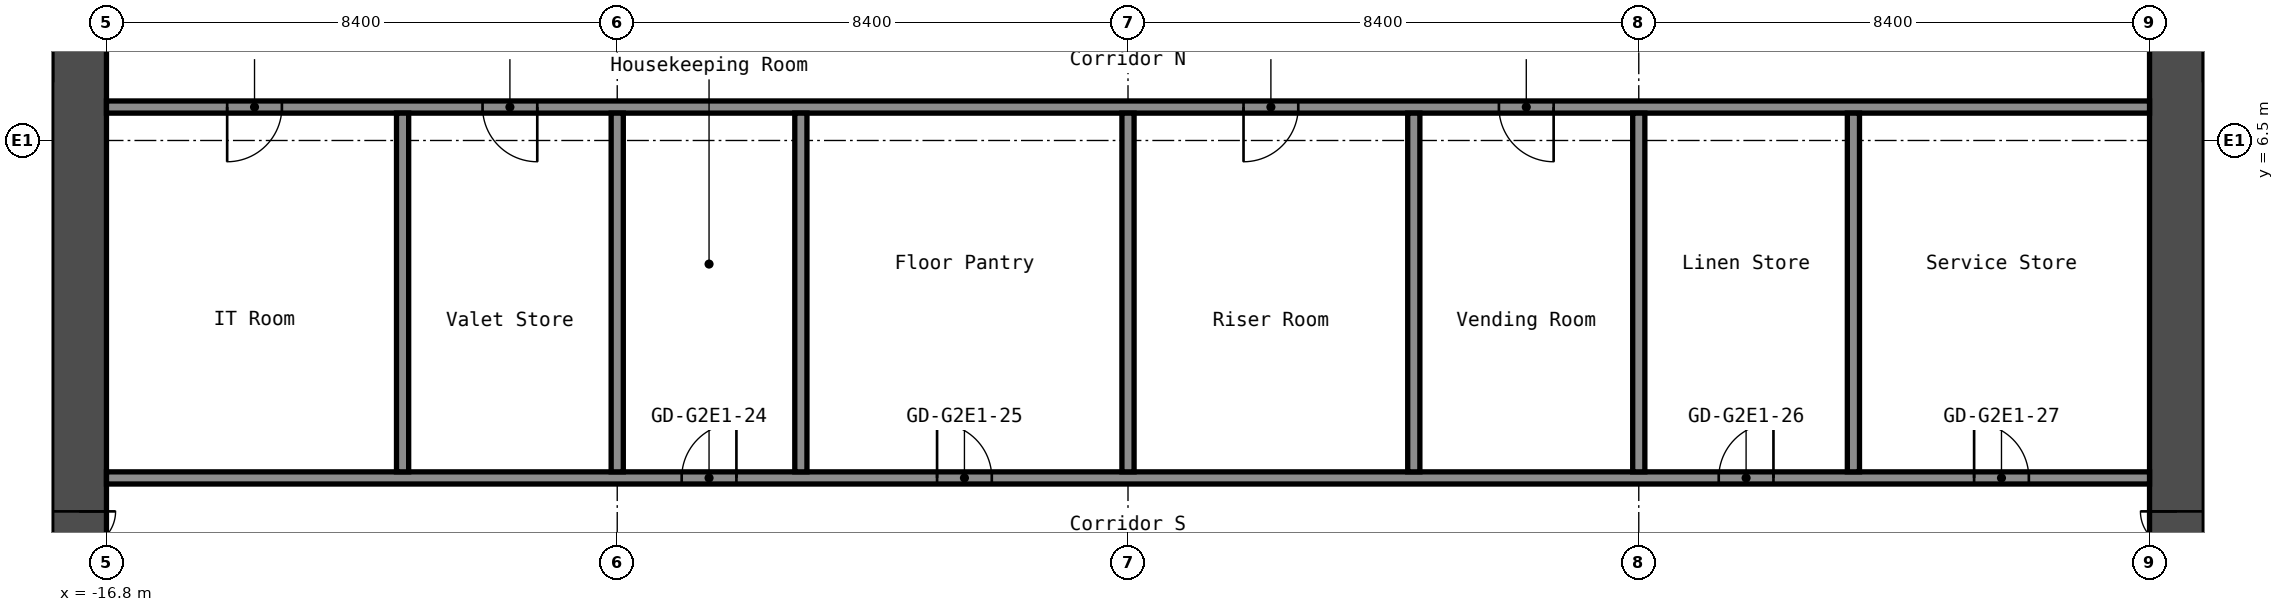
"""IFC4 building model, lengths in metres.
Left out: names, types, materials, properties, quantities, classifications, styles, units other than length and angle.
Written with IfcOpenShell. Run it as: python <this file> out.ifc"""

import sys

from ifc_helpers import new_model, si_unit, direction, frame, frame_2d, origin, place, context, subcontext, project, spatial, rectangle, extrude, element, fill, save


model = new_model("IFC4")
c1 = context("Model", 3, precision=1e-05, world=origin(), true_north=direction((0.0, 1.0)))
c2 = subcontext(c1, "Body", "Model", "MODEL_VIEW")
j1 = project(units=[si_unit("LENGTHUNIT", "METRE"), si_unit("PLANEANGLEUNIT", "RADIAN")], contexts=[c1])
p1 = place(None, origin())
s1 = spatial("IfcSite", under=j1, at=p1, CompositionType="ELEMENT")
p2 = place(p1, origin())
s2 = spatial("IfcBuilding", under=s1, at=p2, CompositionType="ELEMENT")
p3 = place(p2, frame((0.0, 0.0, 104.2)))
s3 = spatial("IfcBuildingStorey", under=s2, at=p3, CompositionType="ELEMENT", Elevation=104.2)
p4 = place(p3, frame((-17.25, -8.4, 0.0), z_axis=(0.0, 0.0, 1.0), x_axis=(0.0, 1.0, 0.0)))
e1 = element("IfcWall", 1, at=p4, inside=s3, PredefinedType="SHEAR", context=c2, shape_type="SweptSolid", body=[
    extrude(rectangle(XDim=16.8, YDim=0.9, at=frame_2d((8.4, 0.0))), origin(), (0.0, 0.0, 1.0), 2.8),
])
p5 = place(p4, frame((7.6, 0.0, 0.0)))
e2 = element("IfcOpeningElement", 2, at=p5, cuts=e1, PredefinedType="OPENING", context=c2, shape_type="SweptSolid", body=[
    extrude(rectangle(XDim=1.2, YDim=2.1, at=frame_2d((0.6, 1.05))), frame((0.0, 0.46, 0.0), z_axis=(0.0, -1.0, 0.0), x_axis=(1.0, 0.0, 0.0)), (0.0, 0.0, 1.0), 0.92),
])
p6 = place(p3, frame((17.25, -8.4, 0.0), z_axis=(0.0, 0.0, 1.0), x_axis=(0.0, 1.0, 0.0)))
e3 = element("IfcWall", 3, at=p6, inside=s3, PredefinedType="SHEAR", context=c2, shape_type="SweptSolid", body=[
    extrude(rectangle(XDim=16.8, YDim=0.9, at=frame_2d((8.4, 0.0))), origin(), (0.0, 0.0, 1.0), 2.8),
])
p7 = place(p6, frame((7.6, 0.0, 0.0)))
e4 = element("IfcOpeningElement", 4, at=p7, cuts=e3, PredefinedType="OPENING", context=c2, shape_type="SweptSolid", body=[
    extrude(rectangle(XDim=1.2, YDim=2.1, at=frame_2d((0.6, 1.05))), frame((0.0, 0.46, 0.0), z_axis=(0.0, -1.0, 0.0), x_axis=(1.0, 0.0, 0.0)), (0.0, 0.0, 1.0), 0.92),
])
p8 = place(p3, frame((-16.8, 0.95, 0.0), z_axis=(0.0, 0.0, 1.0), x_axis=(1.0, 0.0, 0.0)))
e5 = element("IfcWall", 5, at=p8, inside=s3, PredefinedType="PARTITIONING", context=c2, shape_type="SweptSolid", body=[
    extrude(rectangle(XDim=33.6, YDim=0.2, at=frame_2d((16.8, 0.0))), origin(), (0.0, 0.0, 1.0), 2.8),
])
p9 = place(p8, frame((9.46, 0.0, 0.0)))
e6 = element("IfcOpeningElement", 6, at=p9, cuts=e5, PredefinedType="OPENING", context=c2, shape_type="SweptSolid", body=[
    extrude(rectangle(XDim=0.9, YDim=2.1, at=frame_2d((0.45, 1.05))), frame((0.0, 0.11, 0.0), z_axis=(0.0, -1.0, 0.0), x_axis=(1.0, 0.0, 0.0)), (0.0, 0.0, 1.0), 0.22),
])
p10 = place(p8, frame((13.66, 0.0, 0.0)))
e7 = element("IfcOpeningElement", 7, at=p10, cuts=e5, PredefinedType="OPENING", context=c2, shape_type="SweptSolid", body=[
    extrude(rectangle(XDim=0.9, YDim=2.1, at=frame_2d((0.45, 1.05))), frame((0.0, 0.11, 0.0), z_axis=(0.0, -1.0, 0.0), x_axis=(1.0, 0.0, 0.0)), (0.0, 0.0, 1.0), 0.22),
])
p11 = place(p8, frame((26.515, 0.0, 0.0)))
e8 = element("IfcOpeningElement", 8, at=p11, cuts=e5, PredefinedType="OPENING", context=c2, shape_type="SweptSolid", body=[
    extrude(rectangle(XDim=0.9, YDim=2.1, at=frame_2d((0.45, 1.05))), frame((0.0, 0.11, 0.0), z_axis=(0.0, -1.0, 0.0), x_axis=(1.0, 0.0, 0.0)), (0.0, 0.0, 1.0), 0.22),
])
p12 = place(p8, frame((30.715, 0.0, 0.0)))
e9 = element("IfcOpeningElement", 9, at=p12, cuts=e5, PredefinedType="OPENING", context=c2, shape_type="SweptSolid", body=[
    extrude(rectangle(XDim=0.9, YDim=2.1, at=frame_2d((0.45, 1.05))), frame((0.0, 0.11, 0.0), z_axis=(0.0, -1.0, 0.0), x_axis=(1.0, 0.0, 0.0)), (0.0, 0.0, 1.0), 0.22),
])
p13 = place(p3, frame((-16.8, 7.05, 0.0), z_axis=(0.0, 0.0, 1.0), x_axis=(1.0, 0.0, 0.0)))
e10 = element("IfcWall", 10, at=p13, inside=s3, PredefinedType="PARTITIONING", context=c2, shape_type="SweptSolid", body=[
    extrude(rectangle(XDim=33.6, YDim=0.2, at=frame_2d((16.8, 0.0))), origin(), (0.0, 0.0, 1.0), 2.8),
])
p14 = place(p13, frame((1.985, 0.0, 0.0)))
e11 = element("IfcOpeningElement", 11, at=p14, cuts=e10, PredefinedType="OPENING", context=c2, shape_type="SweptSolid", body=[
    extrude(rectangle(XDim=0.9, YDim=2.1, at=frame_2d((0.45, 1.05))), frame((0.0, 0.11, 0.0), z_axis=(0.0, -1.0, 0.0), x_axis=(1.0, 0.0, 0.0)), (0.0, 0.0, 1.0), 0.22),
])
p15 = place(p13, frame((6.185, 0.0, 0.0)))
e12 = element("IfcOpeningElement", 12, at=p15, cuts=e10, PredefinedType="OPENING", context=c2, shape_type="SweptSolid", body=[
    extrude(rectangle(XDim=0.9, YDim=2.1, at=frame_2d((0.45, 1.05))), frame((0.0, 0.11, 0.0), z_axis=(0.0, -1.0, 0.0), x_axis=(1.0, 0.0, 0.0)), (0.0, 0.0, 1.0), 0.22),
])
p16 = place(p13, frame((18.7, 0.0, 0.0)))
e13 = element("IfcOpeningElement", 13, at=p16, cuts=e10, PredefinedType="OPENING", context=c2, shape_type="SweptSolid", body=[
    extrude(rectangle(XDim=0.9, YDim=2.1, at=frame_2d((0.45, 1.05))), frame((0.0, 0.11, 0.0), z_axis=(0.0, -1.0, 0.0), x_axis=(1.0, 0.0, 0.0)), (0.0, 0.0, 1.0), 0.22),
])
p17 = place(p13, frame((22.9, 0.0, 0.0)))
e14 = element("IfcOpeningElement", 14, at=p17, cuts=e10, PredefinedType="OPENING", context=c2, shape_type="SweptSolid", body=[
    extrude(rectangle(XDim=0.9, YDim=2.1, at=frame_2d((0.45, 1.05))), frame((0.0, 0.11, 0.0), z_axis=(0.0, -1.0, 0.0), x_axis=(1.0, 0.0, 0.0)), (0.0, 0.0, 1.0), 0.22),
])
for number, where, z_axis, x_axis in (
    (15, (-11.93, 1.05, 0.0), (0.0, 0.0, 1.0), (0.0, 1.0, 0.0)),
    (16, (-8.4, 1.05, 0.0), (0.0, 0.0, 1.0), (0.0, 1.0, 0.0)),
    (17, (-5.38, 1.05, 0.0), (0.0, 0.0, 1.0), (0.0, 1.0, 0.0)),
    (18, (0.0, 1.05, 0.0), (0.0, 0.0, 1.0), (0.0, 1.0, 0.0)),
    (19, (4.7, 1.05, 0.0), (0.0, 0.0, 1.0), (0.0, 1.0, 0.0)),
    (20, (8.4, 1.05, 0.0), (0.0, 0.0, 1.0), (0.0, 1.0, 0.0)),
    (21, (11.93, 1.05, 0.0), (0.0, 0.0, 1.0), (0.0, 1.0, 0.0)),
):
    element("IfcWall", number, at=place(p3, frame(where, z_axis=z_axis, x_axis=x_axis)), inside=s3, PredefinedType="PARTITIONING", context=c2, shape_type="SweptSolid", body=[
        extrude(rectangle(XDim=5.9, YDim=0.2, at=frame_2d((2.95, 0.0))), origin(), (0.0, 0.0, 1.0), 2.8),
    ])
p18 = place(p5, origin())
e22 = element("IfcDoor", 22, at=p18, inside=s3, OperationType="DOUBLE_DOOR_SINGLE_SWING", PredefinedType="DOOR", context=c2, shape_type="SweptSolid", body=[
    extrude(rectangle(XDim=1.2, YDim=2.1, at=frame_2d((0.6, 1.05))), frame((0.0, 0.025, 0.0), z_axis=(0.0, -1.0, 0.0), x_axis=(1.0, 0.0, 0.0)), (0.0, 0.0, 1.0), 0.05),
])
fill(e2, e22)
p19 = place(p7, origin())
e23 = element("IfcDoor", 23, at=p19, inside=s3, OperationType="DOUBLE_DOOR_SINGLE_SWING", PredefinedType="DOOR", context=c2, shape_type="SweptSolid", body=[
    extrude(rectangle(XDim=1.2, YDim=2.1, at=frame_2d((0.6, 1.05))), frame((0.0, 0.025, 0.0), z_axis=(0.0, -1.0, 0.0), x_axis=(1.0, 0.0, 0.0)), (0.0, 0.0, 1.0), 0.05),
])
fill(e4, e23)
p20 = place(p9, origin())
e24 = element("IfcDoor", 24, at=p20, inside=s3, OperationType="SINGLE_SWING_LEFT", PredefinedType="DOOR", context=c2, shape_type="SweptSolid", body=[
    extrude(rectangle(XDim=0.9, YDim=2.1, at=frame_2d((0.45, 1.05))), frame((0.0, 0.025, 0.0), z_axis=(0.0, -1.0, 0.0), x_axis=(1.0, 0.0, 0.0)), (0.0, 0.0, 1.0), 0.05),
])
fill(e6, e24)
p21 = place(p10, origin())
e25 = element("IfcDoor", 25, at=p21, inside=s3, OperationType="SINGLE_SWING_RIGHT", PredefinedType="DOOR", context=c2, shape_type="SweptSolid", body=[
    extrude(rectangle(XDim=0.9, YDim=2.1, at=frame_2d((0.45, 1.05))), frame((0.0, 0.025, 0.0), z_axis=(0.0, -1.0, 0.0), x_axis=(1.0, 0.0, 0.0)), (0.0, 0.0, 1.0), 0.05),
])
fill(e7, e25)
p22 = place(p11, origin())
e26 = element("IfcDoor", 26, at=p22, inside=s3, OperationType="SINGLE_SWING_LEFT", PredefinedType="DOOR", context=c2, shape_type="SweptSolid", body=[
    extrude(rectangle(XDim=0.9, YDim=2.1, at=frame_2d((0.45, 1.05))), frame((0.0, 0.025, 0.0), z_axis=(0.0, -1.0, 0.0), x_axis=(1.0, 0.0, 0.0)), (0.0, 0.0, 1.0), 0.05),
])
fill(e8, e26)
p23 = place(p12, origin())
e27 = element("IfcDoor", 27, at=p23, inside=s3, OperationType="SINGLE_SWING_RIGHT", PredefinedType="DOOR", context=c2, shape_type="SweptSolid", body=[
    extrude(rectangle(XDim=0.9, YDim=2.1, at=frame_2d((0.45, 1.05))), frame((0.0, 0.025, 0.0), z_axis=(0.0, -1.0, 0.0), x_axis=(1.0, 0.0, 0.0)), (0.0, 0.0, 1.0), 0.05),
])
fill(e9, e27)
p24 = place(p14, origin())
e28 = element("IfcDoor", 28, at=p24, inside=s3, OperationType="SINGLE_SWING_LEFT", PredefinedType="DOOR", context=c2, shape_type="SweptSolid", body=[
    extrude(rectangle(XDim=0.9, YDim=2.1, at=frame_2d((0.45, 1.05))), frame((0.0, 0.025, 0.0), z_axis=(0.0, -1.0, 0.0), x_axis=(1.0, 0.0, 0.0)), (0.0, 0.0, 1.0), 0.05),
])
fill(e11, e28)
p25 = place(p15, origin())
e29 = element("IfcDoor", 29, at=p25, inside=s3, OperationType="SINGLE_SWING_RIGHT", PredefinedType="DOOR", context=c2, shape_type="SweptSolid", body=[
    extrude(rectangle(XDim=0.9, YDim=2.1, at=frame_2d((0.45, 1.05))), frame((0.0, 0.025, 0.0), z_axis=(0.0, -1.0, 0.0), x_axis=(1.0, 0.0, 0.0)), (0.0, 0.0, 1.0), 0.05),
])
fill(e12, e29)
p26 = place(p16, origin())
e30 = element("IfcDoor", 30, at=p26, inside=s3, OperationType="SINGLE_SWING_LEFT", PredefinedType="DOOR", context=c2, shape_type="SweptSolid", body=[
    extrude(rectangle(XDim=0.9, YDim=2.1, at=frame_2d((0.45, 1.05))), frame((0.0, 0.025, 0.0), z_axis=(0.0, -1.0, 0.0), x_axis=(1.0, 0.0, 0.0)), (0.0, 0.0, 1.0), 0.05),
])
fill(e13, e30)
p27 = place(p17, origin())
e31 = element("IfcDoor", 31, at=p27, inside=s3, OperationType="SINGLE_SWING_RIGHT", PredefinedType="DOOR", context=c2, shape_type="SweptSolid", body=[
    extrude(rectangle(XDim=0.9, YDim=2.1, at=frame_2d((0.45, 1.05))), frame((0.0, 0.025, 0.0), z_axis=(0.0, -1.0, 0.0), x_axis=(1.0, 0.0, 0.0)), (0.0, 0.0, 1.0), 0.05),
])
fill(e14, e31)
save(model, sys.argv[1])
